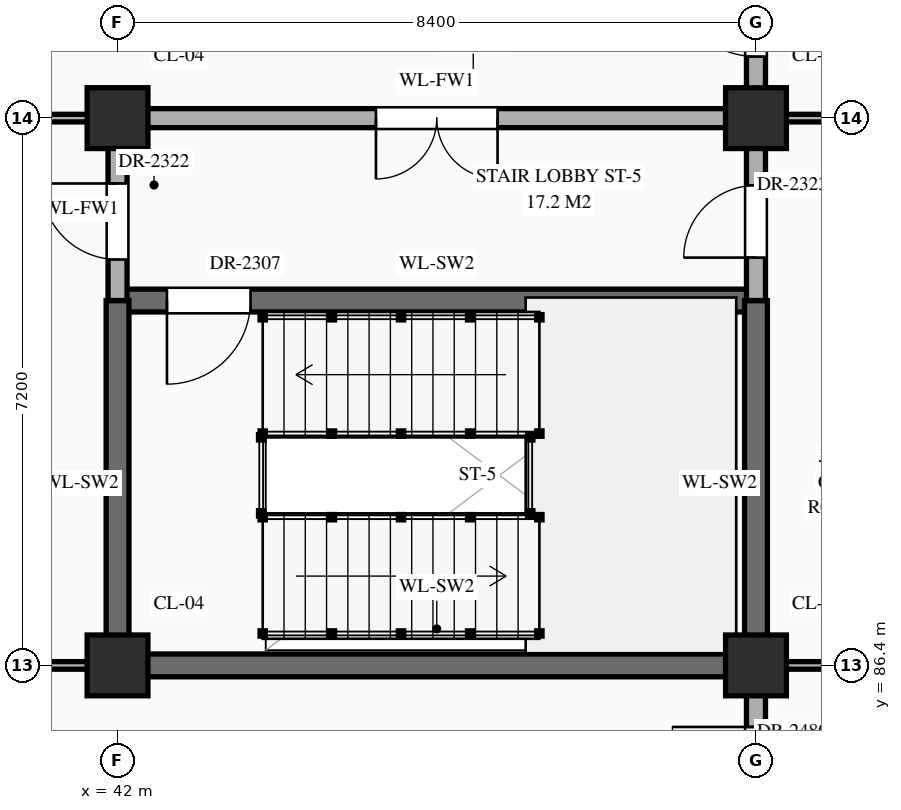
"""IFC4 building model, lengths in metres.
Left out: names, types, materials, properties, quantities, classifications, styles, units other than length and angle.
Written with IfcOpenShell. Run it as: python <this file> out.ifc"""

import sys

from ifc_helpers import new_model, si_unit, direction, frame, frame_2d, origin, origin_2d, place, context, subcontext, project, spatial, rectangle, extrude, element, fill, save


model = new_model("IFC4")
c1 = context("Model", 3, precision=1e-05, world=origin(), true_north=direction((0.0, 1.0)))
c2 = subcontext(c1, "Body", "Model", "MODEL_VIEW")
j1 = project(units=[si_unit("LENGTHUNIT", "METRE"), si_unit("PLANEANGLEUNIT", "RADIAN")], contexts=[c1])
p1 = place(None, origin())
s1 = spatial("IfcSite", under=j1, at=p1, CompositionType="ELEMENT")
p2 = place(p1, origin())
s2 = spatial("IfcBuilding", under=s1, at=p2, CompositionType="ELEMENT")
p3 = place(p2, frame((0.0, 0.0, 30.6)))
s3 = spatial("IfcBuildingStorey", under=s2, at=p3, CompositionType="ELEMENT", Elevation=30.6)
for number, where, z_axis, x_axis in (
    (1, (42.0, 86.4, 0.0), (0.0, 0.0, 1.0), (1.0, 0.0, 0.0)),
    (2, (42.0, 93.6, 0.0), (0.0, 0.0, 1.0), (1.0, 0.0, 0.0)),
    (3, (50.4, 86.4, 0.0), (0.0, 0.0, 1.0), (1.0, 0.0, 0.0)),
    (4, (50.4, 93.6, 0.0), (0.0, 0.0, 1.0), (1.0, 0.0, 0.0)),
):
    element("IfcColumn", number, at=place(p3, frame(where, z_axis=z_axis, x_axis=x_axis)), inside=s3, PredefinedType="COLUMN", context=c2, shape_type="SweptSolid", body=[
        extrude(rectangle(XDim=0.8, YDim=0.8, at=origin_2d()), origin(), (0.0, 0.0, 1.0), 4.5),
    ])
p4 = place(p3, frame((25.24, 86.4, 0.0), z_axis=(0.0, 0.0, 1.0), x_axis=(1.0, 0.0, 0.0)))
e5 = element("IfcWall", 5, at=p4, inside=s3, PredefinedType="STANDARD", context=c2, shape_type="SweptSolid", body=[
    extrude(rectangle(XDim=16.76, YDim=0.1, at=frame_2d((8.38, 0.0))), origin(), (0.0, 0.0, 1.0), 3.1),
])
p5 = place(p4, frame((1.09, 0.0, 0.0)))
e6 = element("IfcOpeningElement", 6, at=p5, cuts=e5, PredefinedType="OPENING", context=c2, shape_type="SweptSolid", body=[
    extrude(rectangle(XDim=0.86, YDim=2.1, at=frame_2d((0.43, 1.05))), frame((0.0, 0.062, 0.0), z_axis=(0.0, -1.0, 0.0), x_axis=(1.0, 0.0, 0.0)), (0.0, 0.0, 1.0), 0.124),
])
p6 = place(p4, frame((3.31, 0.0, 0.0)))
e7 = element("IfcOpeningElement", 7, at=p6, cuts=e5, PredefinedType="OPENING", context=c2, shape_type="SweptSolid", body=[
    extrude(rectangle(XDim=1.7, YDim=2.45, at=frame_2d((0.85, 1.225))), frame((0.0, 0.062, 0.0), z_axis=(0.0, -1.0, 0.0), x_axis=(1.0, 0.0, 0.0)), (0.0, 0.0, 1.0), 0.124),
])
p7 = place(p4, frame((6.46, 0.0, 0.0)))
e8 = element("IfcOpeningElement", 8, at=p7, cuts=e5, PredefinedType="OPENING", context=c2, shape_type="SweptSolid", body=[
    extrude(rectangle(XDim=1.0, YDim=2.25, at=frame_2d((0.5, 1.125))), frame((0.0, 0.062, 0.0), z_axis=(0.0, -1.0, 0.0), x_axis=(1.0, 0.0, 0.0)), (0.0, 0.0, 1.0), 0.124),
])
p8 = place(p4, frame((11.88, 0.0, 0.0)))
e9 = element("IfcOpeningElement", 9, at=p8, cuts=e5, PredefinedType="OPENING", context=c2, shape_type="SweptSolid", body=[
    extrude(rectangle(XDim=1.04, YDim=2.2, at=frame_2d((0.52, 1.1))), frame((0.0, 0.062, 0.0), z_axis=(0.0, -1.0, 0.0), x_axis=(1.0, 0.0, 0.0)), (0.0, 0.0, 1.0), 0.124),
])
p9 = place(p3, frame((42.0, 86.4, 0.0), z_axis=(0.0, 0.0, 1.0), x_axis=(1.0, 0.0, 0.0)))
e10 = element("IfcWall", 10, at=p9, inside=s3, PredefinedType="SHEAR", context=c2, shape_type="SweptSolid", body=[
    extrude(rectangle(XDim=8.4, YDim=0.3, at=frame_2d((4.2, 0.0))), origin(), (0.0, 0.0, 1.0), 4.24),
])
p10 = place(p3, frame((50.4, 86.4, 0.0), z_axis=(0.0, 0.0, 1.0), x_axis=(1.0, 0.0, 0.0)))
e11 = element("IfcWall", 11, at=p10, inside=s3, PredefinedType="STANDARD", context=c2, shape_type="SweptSolid", body=[
    extrude(rectangle(XDim=8.4, YDim=0.1, at=frame_2d((4.2, 0.0))), origin(), (0.0, 0.0, 1.0), 3.39),
])
p11 = place(p10, frame((1.0, 0.0, 0.0)))
e12 = element("IfcOpeningElement", 12, at=p11, cuts=e11, PredefinedType="OPENING", context=c2, shape_type="SweptSolid", body=[
    extrude(rectangle(XDim=1.12, YDim=2.25, at=frame_2d((0.56, 1.125))), frame((0.0, 0.062, 0.0), z_axis=(0.0, -1.0, 0.0), x_axis=(1.0, 0.0, 0.0)), (0.0, 0.0, 1.0), 0.124),
])
p12 = place(p10, frame((3.6, 0.0, 0.0)))
e13 = element("IfcOpeningElement", 13, at=p12, cuts=e11, PredefinedType="OPENING", context=c2, shape_type="SweptSolid", body=[
    extrude(rectangle(XDim=1.2, YDim=2.35, at=frame_2d((0.6, 1.175))), frame((0.0, 0.062, 0.0), z_axis=(0.0, -1.0, 0.0), x_axis=(1.0, 0.0, 0.0)), (0.0, 0.0, 1.0), 0.124),
])
p13 = place(p10, frame((6.22, 0.0, 0.0)))
e14 = element("IfcOpeningElement", 14, at=p13, cuts=e11, PredefinedType="OPENING", context=c2, shape_type="SweptSolid", body=[
    extrude(rectangle(XDim=1.24, YDim=2.3, at=frame_2d((0.62, 1.15))), frame((0.0, 0.062, 0.0), z_axis=(0.0, -1.0, 0.0), x_axis=(1.0, 0.0, 0.0)), (0.0, 0.0, 1.0), 0.124),
])
p14 = place(p3, frame((42.0, 91.2, 0.0), z_axis=(0.0, 0.0, 1.0), x_axis=(1.0, 0.0, 0.0)))
e15 = element("IfcWall", 15, at=p14, inside=s3, PredefinedType="SHEAR", context=c2, shape_type="SweptSolid", body=[
    extrude(rectangle(XDim=8.4, YDim=0.3, at=frame_2d((4.2, 0.0))), origin(), (0.0, 0.0, 1.0), 4.24),
])
p15 = place(p14, frame((0.65, 0.0, 0.0)))
e16 = element("IfcOpeningElement", 16, at=p15, cuts=e15, PredefinedType="OPENING", context=c2, shape_type="SweptSolid", body=[
    extrude(rectangle(XDim=1.1, YDim=2.2, at=frame_2d((0.55, 1.1))), frame((0.0, 0.162, 0.0), z_axis=(0.0, -1.0, 0.0), x_axis=(1.0, 0.0, 0.0)), (0.0, 0.0, 1.0), 0.324),
])
p16 = place(p3, frame((25.24, 93.6, 0.0), z_axis=(0.0, 0.0, 1.0), x_axis=(1.0, 0.0, 0.0)))
e17 = element("IfcWall", 17, at=p16, inside=s3, PredefinedType="STANDARD", context=c2, shape_type="SweptSolid", body=[
    extrude(rectangle(XDim=16.76, YDim=0.1, at=frame_2d((8.38, 0.0))), origin(), (0.0, 0.0, 1.0), 3.1),
])
p17 = place(p16, frame((1.04, 0.0, 0.0)))
e18 = element("IfcOpeningElement", 18, at=p17, cuts=e17, PredefinedType="OPENING", context=c2, shape_type="SweptSolid", body=[
    extrude(rectangle(XDim=0.96, YDim=2.2, at=frame_2d((0.48, 1.1))), frame((0.0, 0.062, 0.0), z_axis=(0.0, -1.0, 0.0), x_axis=(1.0, 0.0, 0.0)), (0.0, 0.0, 1.0), 0.124),
])
p18 = place(p16, frame((3.335, 0.0, 0.0)))
e19 = element("IfcOpeningElement", 19, at=p18, cuts=e17, PredefinedType="OPENING", context=c2, shape_type="SweptSolid", body=[
    extrude(rectangle(XDim=1.65, YDim=2.4, at=frame_2d((0.825, 1.2))), frame((0.0, 0.062, 0.0), z_axis=(0.0, -1.0, 0.0), x_axis=(1.0, 0.0, 0.0)), (0.0, 0.0, 1.0), 0.124),
])
p19 = place(p16, frame((6.44, 0.0, 0.0)))
e20 = element("IfcOpeningElement", 20, at=p19, cuts=e17, PredefinedType="OPENING", context=c2, shape_type="SweptSolid", body=[
    extrude(rectangle(XDim=1.04, YDim=2.2, at=frame_2d((0.52, 1.1))), frame((0.0, 0.062, 0.0), z_axis=(0.0, -1.0, 0.0), x_axis=(1.0, 0.0, 0.0)), (0.0, 0.0, 1.0), 0.124),
])
p20 = place(p16, frame((11.86, 0.0, 0.0)))
e21 = element("IfcOpeningElement", 21, at=p20, cuts=e17, PredefinedType="OPENING", context=c2, shape_type="SweptSolid", body=[
    extrude(rectangle(XDim=1.08, YDim=2.25, at=frame_2d((0.54, 1.125))), frame((0.0, 0.062, 0.0), z_axis=(0.0, -1.0, 0.0), x_axis=(1.0, 0.0, 0.0)), (0.0, 0.0, 1.0), 0.124),
])
p21 = place(p3, frame((42.0, 93.6, 0.0), z_axis=(0.0, 0.0, 1.0), x_axis=(1.0, 0.0, 0.0)))
e22 = element("IfcWall", 22, at=p21, inside=s3, PredefinedType="STANDARD", context=c2, shape_type="SweptSolid", body=[
    extrude(rectangle(XDim=8.4, YDim=0.25, at=frame_2d((4.2, 0.0))), origin(), (0.0, 0.0, 1.0), 3.39),
])
p22 = place(p21, frame((3.4, 0.0, 0.0)))
e23 = element("IfcOpeningElement", 23, at=p22, cuts=e22, PredefinedType="OPENING", context=c2, shape_type="SweptSolid", body=[
    extrude(rectangle(XDim=1.6, YDim=2.3, at=frame_2d((0.8, 1.15))), frame((0.0, 0.137, 0.0), z_axis=(0.0, -1.0, 0.0), x_axis=(1.0, 0.0, 0.0)), (0.0, 0.0, 1.0), 0.274),
])
p23 = place(p3, frame((50.4, 93.6, 0.0), z_axis=(0.0, 0.0, 1.0), x_axis=(1.0, 0.0, 0.0)))
e24 = element("IfcWall", 24, at=p23, inside=s3, PredefinedType="STANDARD", context=c2, shape_type="SweptSolid", body=[
    extrude(rectangle(XDim=8.4, YDim=0.1, at=frame_2d((4.2, 0.0))), origin(), (0.0, 0.0, 1.0), 3.39),
])
p24 = place(p23, frame((1.05, 0.0, 0.0)))
e25 = element("IfcOpeningElement", 25, at=p24, cuts=e24, PredefinedType="OPENING", context=c2, shape_type="SweptSolid", body=[
    extrude(rectangle(XDim=1.02, YDim=2.4, at=frame_2d((0.51, 1.2))), frame((0.0, 0.062, 0.0), z_axis=(0.0, -1.0, 0.0), x_axis=(1.0, 0.0, 0.0)), (0.0, 0.0, 1.0), 0.124),
])
p25 = place(p23, frame((3.67, 0.0, 0.0)))
e26 = element("IfcOpeningElement", 26, at=p25, cuts=e24, PredefinedType="OPENING", context=c2, shape_type="SweptSolid", body=[
    extrude(rectangle(XDim=1.06, YDim=2.4, at=frame_2d((0.53, 1.2))), frame((0.0, 0.062, 0.0), z_axis=(0.0, -1.0, 0.0), x_axis=(1.0, 0.0, 0.0)), (0.0, 0.0, 1.0), 0.124),
])
p26 = place(p23, frame((6.27, 0.0, 0.0)))
e27 = element("IfcOpeningElement", 27, at=p26, cuts=e24, PredefinedType="OPENING", context=c2, shape_type="SweptSolid", body=[
    extrude(rectangle(XDim=1.14, YDim=2.4, at=frame_2d((0.57, 1.2))), frame((0.0, 0.062, 0.0), z_axis=(0.0, -1.0, 0.0), x_axis=(1.0, 0.0, 0.0)), (0.0, 0.0, 1.0), 0.124),
])
p27 = place(p3, frame((42.0, 86.4, 0.0), z_axis=(0.0, 0.0, 1.0), x_axis=(0.0, 1.0, 0.0)))
e28 = element("IfcWall", 28, at=p27, inside=s3, PredefinedType="SHEAR", context=c2, shape_type="SweptSolid", body=[
    extrude(rectangle(XDim=4.8, YDim=0.3, at=frame_2d((2.4, 0.0))), origin(), (0.0, 0.0, 1.0), 4.15),
])
p28 = place(p3, frame((42.0, 91.2, 0.0), z_axis=(0.0, 0.0, 1.0), x_axis=(0.0, 1.0, 0.0)))
e29 = element("IfcWall", 29, at=p28, inside=s3, PredefinedType="STANDARD", context=c2, shape_type="SweptSolid", body=[
    extrude(rectangle(XDim=2.4, YDim=0.25, at=frame_2d((1.2, 0.0))), origin(), (0.0, 0.0, 1.0), 3.4),
])
p29 = place(p28, frame((0.54, 0.0, 0.0)))
e30 = element("IfcOpeningElement", 30, at=p29, cuts=e29, PredefinedType="OPENING", context=c2, shape_type="SweptSolid", body=[
    extrude(rectangle(XDim=1.0, YDim=2.2, at=frame_2d((0.5, 1.1))), frame((0.0, 0.137, 0.0), z_axis=(0.0, -1.0, 0.0), x_axis=(1.0, 0.0, 0.0)), (0.0, 0.0, 1.0), 0.274),
])
p30 = place(p3, frame((50.4, 79.24, 0.0), z_axis=(0.0, 0.0, 1.0), x_axis=(0.0, 1.0, 0.0)))
e31 = element("IfcWall", 31, at=p30, inside=s3, PredefinedType="STANDARD", context=c2, shape_type="SweptSolid", body=[
    extrude(rectangle(XDim=7.16, YDim=0.25, at=frame_2d((3.58, 0.0))), origin(), (0.0, 0.0, 1.0), 3.49),
])
p31 = place(p30, frame((5.25, 0.0, 0.0)))
e32 = element("IfcOpeningElement", 32, at=p31, cuts=e31, PredefinedType="OPENING", context=c2, shape_type="SweptSolid", body=[
    extrude(rectangle(XDim=1.1, YDim=2.2, at=frame_2d((0.55, 1.1))), frame((0.0, 0.137, 0.0), z_axis=(0.0, -1.0, 0.0), x_axis=(1.0, 0.0, 0.0)), (0.0, 0.0, 1.0), 0.274),
])
p32 = place(p3, frame((50.4, 86.4, 0.0), z_axis=(0.0, 0.0, 1.0), x_axis=(0.0, 1.0, 0.0)))
e33 = element("IfcWall", 33, at=p32, inside=s3, PredefinedType="SHEAR", context=c2, shape_type="SweptSolid", body=[
    extrude(rectangle(XDim=4.8, YDim=0.3, at=frame_2d((2.4, 0.0))), origin(), (0.0, 0.0, 1.0), 4.24),
])
p33 = place(p3, frame((50.4, 91.2, 0.0), z_axis=(0.0, 0.0, 1.0), x_axis=(0.0, 1.0, 0.0)))
e34 = element("IfcWall", 34, at=p33, inside=s3, PredefinedType="STANDARD", context=c2, shape_type="SweptSolid", body=[
    extrude(rectangle(XDim=13.2, YDim=0.25, at=frame_2d((6.6, 0.0))), origin(), (0.0, 0.0, 1.0), 3.49),
])
p34 = place(p33, frame((0.565, 0.0, 0.0)))
e35 = element("IfcOpeningElement", 35, at=p34, cuts=e34, PredefinedType="OPENING", context=c2, shape_type="SweptSolid", body=[
    extrude(rectangle(XDim=0.95, YDim=2.15, at=frame_2d((0.475, 1.075))), frame((0.0, 0.137, 0.0), z_axis=(0.0, -1.0, 0.0), x_axis=(1.0, 0.0, 0.0)), (0.0, 0.0, 1.0), 0.274),
])
p35 = place(p33, frame((10.46, 0.0, 0.0)))
e36 = element("IfcOpeningElement", 36, at=p35, cuts=e34, PredefinedType="OPENING", context=c2, shape_type="SweptSolid", body=[
    extrude(rectangle(XDim=1.0, YDim=2.2, at=frame_2d((0.5, 1.1))), frame((0.0, 0.137, 0.0), z_axis=(0.0, -1.0, 0.0), x_axis=(1.0, 0.0, 0.0)), (0.0, 0.0, 1.0), 0.274),
])
p36 = place(p33, frame((3.21, 0.0, 0.0)))
e37 = element("IfcOpeningElement", 37, at=p36, cuts=e34, PredefinedType="OPENING", context=c2, shape_type="SweptSolid", body=[
    extrude(rectangle(XDim=1.1, YDim=2.2, at=frame_2d((0.55, 1.1))), frame((0.0, 0.137, 0.0), z_axis=(0.0, -1.0, 0.0), x_axis=(1.0, 0.0, 0.0)), (0.0, 0.0, 1.0), 0.274),
])
p37 = place(p15, frame((1.1, 0.0, 0.0), z_axis=(0.0, 0.0, 1.0), x_axis=(-1.0, 0.0, 0.0)))
e38 = element("IfcDoor", 38, at=p37, inside=s3, OperationType="SINGLE_SWING_RIGHT", PredefinedType="DOOR", context=c2, shape_type="SweptSolid", body=[
    extrude(rectangle(XDim=1.1, YDim=2.2, at=frame_2d((0.55, 1.1))), frame((0.0, 0.025, 0.0), z_axis=(0.0, -1.0, 0.0), x_axis=(1.0, 0.0, 0.0)), (0.0, 0.0, 1.0), 0.05),
])
fill(e16, e38)
p38 = place(p22, frame((1.6, 0.0, 0.0), z_axis=(0.0, 0.0, 1.0), x_axis=(-1.0, 0.0, 0.0)))
e39 = element("IfcDoor", 39, at=p38, inside=s3, OperationType="DOUBLE_DOOR_SINGLE_SWING", PredefinedType="DOOR", context=c2, shape_type="SweptSolid", body=[
    extrude(rectangle(XDim=1.6, YDim=2.3, at=frame_2d((0.8, 1.15))), frame((0.0, 0.025, 0.0), z_axis=(0.0, -1.0, 0.0), x_axis=(1.0, 0.0, 0.0)), (0.0, 0.0, 1.0), 0.05),
])
fill(e23, e39)
p39 = place(p29, origin())
e40 = element("IfcDoor", 40, at=p39, inside=s3, OperationType="SINGLE_SWING_RIGHT", PredefinedType="DOOR", context=c2, shape_type="SweptSolid", body=[
    extrude(rectangle(XDim=1.0, YDim=2.2, at=frame_2d((0.5, 1.1))), frame((0.0, 0.025, 0.0), z_axis=(0.0, -1.0, 0.0), x_axis=(1.0, 0.0, 0.0)), (0.0, 0.0, 1.0), 0.05),
])
fill(e30, e40)
p40 = place(p34, origin())
e41 = element("IfcDoor", 41, at=p40, inside=s3, OperationType="SINGLE_SWING_LEFT", PredefinedType="DOOR", context=c2, shape_type="SweptSolid", body=[
    extrude(rectangle(XDim=0.95, YDim=2.15, at=frame_2d((0.475, 1.075))), frame((0.0, 0.025, 0.0), z_axis=(0.0, -1.0, 0.0), x_axis=(1.0, 0.0, 0.0)), (0.0, 0.0, 1.0), 0.05),
])
fill(e35, e41)
p41 = place(p36, origin())
e42 = element("IfcDoor", 42, at=p41, inside=s3, OperationType="SINGLE_SWING_RIGHT", PredefinedType="DOOR", context=c2, shape_type="SweptSolid", body=[
    extrude(rectangle(XDim=1.1, YDim=2.2, at=frame_2d((0.55, 1.1))), frame((0.0, 0.025, 0.0), z_axis=(0.0, -1.0, 0.0), x_axis=(1.0, 0.0, 0.0)), (0.0, 0.0, 1.0), 0.05),
])
fill(e37, e42)
p42 = place(p31, origin())
e43 = element("IfcDoor", 43, at=p42, inside=s3, OperationType="SINGLE_SWING_RIGHT", PredefinedType="DOOR", context=c2, shape_type="SweptSolid", body=[
    extrude(rectangle(XDim=1.1, YDim=2.2, at=frame_2d((0.55, 1.1))), frame((0.0, 0.025, 0.0), z_axis=(0.0, -1.0, 0.0), x_axis=(1.0, 0.0, 0.0)), (0.0, 0.0, 1.0), 0.05),
])
fill(e32, e43)
save(model, sys.argv[1])
